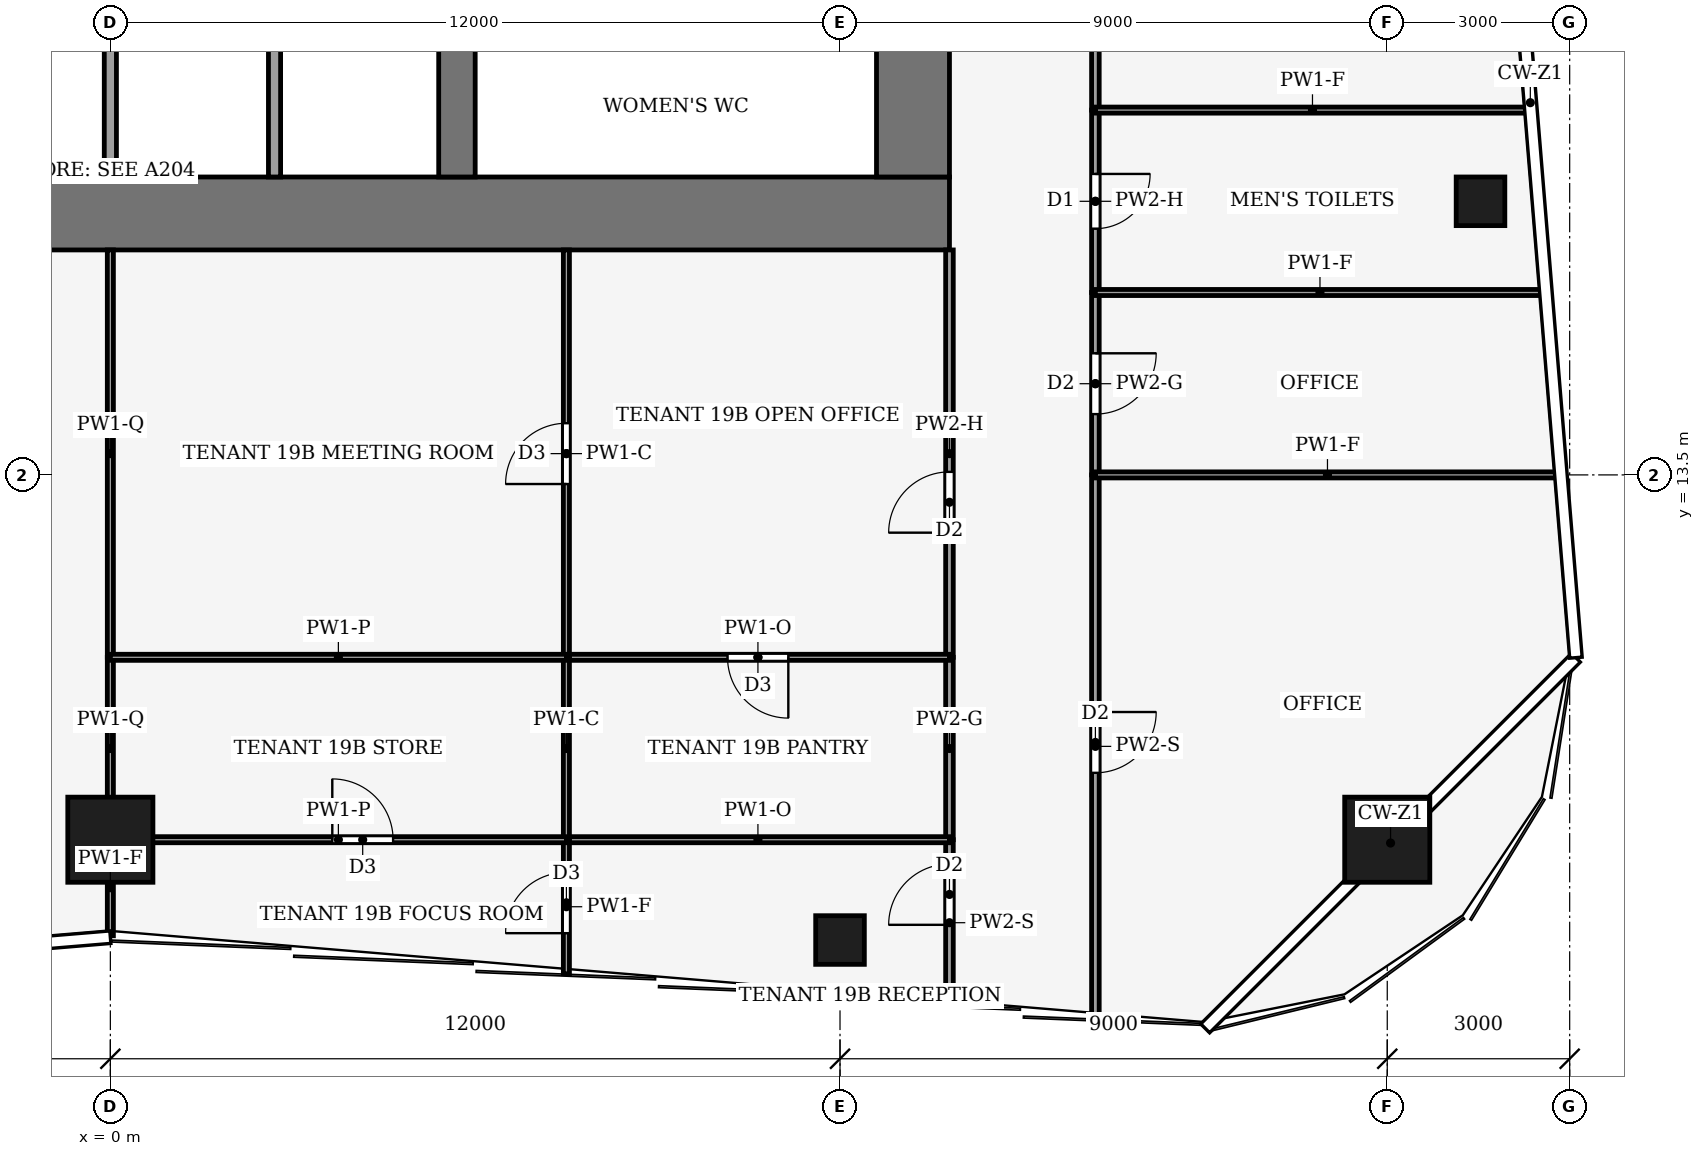
"""IFC4 building model, lengths in metres.
Left out: names, types, materials, properties, quantities, classifications, styles, units other than length and angle.
Written with IfcOpenShell. Run it as: python <this file> out.ifc"""

import sys

from ifc_helpers import new_model, si_unit, direction, frame, frame_2d, origin, origin_2d, place, context, subcontext, project, spatial, rectangle, hollow_rectangle, extrude, element, fill, save


model = new_model("IFC4")
c1 = context("Model", 3, precision=1e-05, world=origin(), true_north=direction((0.0, 1.0)))
c2 = subcontext(c1, "Body", "Model", "MODEL_VIEW")
j1 = project(units=[si_unit("LENGTHUNIT", "METRE"), si_unit("PLANEANGLEUNIT", "RADIAN")], contexts=[c1])
p1 = place(None, origin())
s1 = spatial("IfcSite", under=j1, at=p1, CompositionType="ELEMENT")
p2 = place(p1, origin())
s2 = spatial("IfcBuilding", under=s1, at=p2, CompositionType="ELEMENT")
p3 = place(p2, frame((0.0, 0.0, 86.0)))
s3 = spatial("IfcBuildingStorey", under=s2, at=p3, CompositionType="ELEMENT", Elevation=86.0)
p4 = place(p3, frame((-13.8, 17.8, -0.13), z_axis=(0.0, 0.0, 1.0), x_axis=(1.0, 0.0, 0.0)))
e1 = element("IfcWall", 1, at=p4, inside=s3, PredefinedType="SHEAR", context=c2, shape_type="SweptSolid", body=[
    extrude(rectangle(XDim=27.6, YDim=1.2, at=frame_2d((13.8, 0.0))), origin(), (0.0, 0.0, 1.0), 4.0),
])
p5 = place(p3, frame((13.2, 18.4, -0.13), z_axis=(0.0, 0.0, 1.0), x_axis=(0.0, 1.0, 0.0)))
e2 = element("IfcWall", 2, at=p5, inside=s3, PredefinedType="SHEAR", context=c2, shape_type="SweptSolid", body=[
    extrude(rectangle(XDim=19.2, YDim=1.2, at=frame_2d((9.6, 0.0))), origin(), (0.0, 0.0, 1.0), 4.0),
])
p6 = place(p5, frame((2.8, 0.0, 0.13)))
e3 = element("IfcOpeningElement", 3, at=p6, cuts=e2, PredefinedType="OPENING", context=c2, shape_type="SweptSolid", body=[
    extrude(rectangle(XDim=2.4, YDim=2.4, at=frame_2d((1.2, 1.2))), frame((0.0, 0.61, 0.0), z_axis=(0.0, -1.0, 0.0), x_axis=(1.0, 0.0, 0.0)), (0.0, 0.0, 1.0), 1.22),
])
p7 = place(p5, frame((13.3, 0.0, 0.13)))
e4 = element("IfcOpeningElement", 4, at=p7, cuts=e2, PredefinedType="OPENING", context=c2, shape_type="SweptSolid", body=[
    extrude(rectangle(XDim=2.4, YDim=2.4, at=frame_2d((1.2, 1.2))), frame((0.0, 0.61, 0.0), z_axis=(0.0, -1.0, 0.0), x_axis=(1.0, 0.0, 0.0)), (0.0, 0.0, 1.0), 1.22),
])
p8 = place(p3, frame((5.7, 18.4, -0.13), z_axis=(0.0, 0.0, 1.0), x_axis=(0.0, 1.0, 0.0)))
e5 = element("IfcWall", 5, at=p8, inside=s3, PredefinedType="SHEAR", context=c2, shape_type="SweptSolid", body=[
    extrude(rectangle(XDim=19.2, YDim=0.6, at=frame_2d((9.6, 0.0))), origin(), (0.0, 0.0, 1.0), 4.0),
])
p9 = place(p8, frame((13.3, 0.0, 0.13)))
e6 = element("IfcOpeningElement", 6, at=p9, cuts=e5, PredefinedType="OPENING", context=c2, shape_type="SweptSolid", body=[
    extrude(rectangle(XDim=2.4, YDim=2.4, at=frame_2d((1.2, 1.2))), frame((0.0, 0.31, 0.0), z_axis=(0.0, -1.0, 0.0), x_axis=(1.0, 0.0, 0.0)), (0.0, 0.0, 1.0), 0.62),
])
for number, where, z_axis, x_axis in (
    (7, (21.0, 7.5, 0.0), (0.0, 0.0, 1.0), (1.0, 0.0, 0.0)),
    (8, (0.0, 7.5, 0.0), (0.0, 0.0, 1.0), (1.0, 0.0, 0.0)),
):
    element("IfcColumn", number, at=place(p3, frame(where, z_axis=z_axis, x_axis=x_axis)), inside=s3, PredefinedType="COLUMN", context=c2, shape_type="SweptSolid", body=[
        extrude(hollow_rectangle(XDim=1.4, YDim=1.4, WallThickness=0.08, at=origin_2d()), origin(), (0.0, 0.0, 1.0), 4.0),
    ])
for number, where, z_axis, x_axis in (
    (9, (12.0, 5.85, 0.0), (0.0, 0.0, 1.0), (1.0, 0.0, 0.0)),
    (10, (22.534, 18.0, 0.0), (0.0, 0.0, 1.0), (1.0, 0.0, 0.0)),
):
    element("IfcColumn", number, at=place(p3, frame(where, z_axis=z_axis, x_axis=x_axis)), inside=s3, PredefinedType="COLUMN", context=c2, shape_type="SweptSolid", body=[
        extrude(hollow_rectangle(XDim=0.8, YDim=0.8, WallThickness=0.04, at=origin_2d()), origin(), (0.0, 0.0, 1.0), 4.0),
    ])
for number, where, z_axis, x_axis in (
    (11, (0.0, 18.4, 0.0), (0.0, 0.0, 1.0), (0.0, 1.0, 0.0)),
    (12, (2.7, 18.4, 0.0), (0.0, 0.0, 1.0), (0.0, 1.0, 0.0)),
):
    element("IfcWall", number, at=place(p3, frame(where, z_axis=z_axis, x_axis=x_axis)), inside=s3, PredefinedType="PARTITIONING", context=c2, shape_type="SweptSolid", body=[
        extrude(rectangle(XDim=2.4, YDim=0.2, at=frame_2d((1.2, 0.0))), origin(), (0.0, 0.0, 1.0), 3.87),
    ])
p10 = place(p3, frame((16.2, 13.5, 0.0), z_axis=(0.0, 0.0, 1.0), x_axis=(0.0, -1.0, 0.0)))
e13 = element("IfcWall", 13, at=p10, inside=s3, PredefinedType="PARTITIONING", context=c2, shape_type="SweptSolid", body=[
    extrude(rectangle(XDim=8.93, YDim=0.125, at=frame_2d((4.465, 0.0))), origin(), (0.0, 0.0, 1.0), 3.04),
])
p11 = place(p10, frame((3.9, 0.0, 0.0)))
e14 = element("IfcOpeningElement", 14, at=p11, cuts=e13, PredefinedType="OPENING", context=c2, shape_type="SweptSolid", body=[
    extrude(rectangle(XDim=1.0, YDim=2.1, at=frame_2d((0.5, 1.05))), frame((0.0, 0.073, 0.0), z_axis=(0.0, -1.0, 0.0), x_axis=(1.0, 0.0, 0.0)), (0.0, 0.0, 1.0), 0.145),
])
p12 = place(p3, frame((16.2, 16.5, 0.0), z_axis=(0.0, 0.0, 1.0), x_axis=(0.0, -1.0, 0.0)))
e15 = element("IfcWall", 15, at=p12, inside=s3, PredefinedType="PARTITIONING", context=c2, shape_type="SweptSolid", body=[
    extrude(rectangle(XDim=3.0, YDim=0.125, at=frame_2d((1.5, 0.0))), origin(), (0.0, 0.0, 1.0), 3.87),
])
p13 = place(p12, frame((1.0, 0.0, 0.0)))
e16 = element("IfcOpeningElement", 16, at=p13, cuts=e15, PredefinedType="OPENING", context=c2, shape_type="SweptSolid", body=[
    extrude(rectangle(XDim=1.0, YDim=2.1, at=frame_2d((0.5, 1.05))), frame((0.0, 0.073, 0.0), z_axis=(0.0, -1.0, 0.0), x_axis=(1.0, 0.0, 0.0)), (0.0, 0.0, 1.0), 0.145),
])
p14 = place(p3, frame((16.2, 19.5, 0.0), z_axis=(0.0, 0.0, 1.0), x_axis=(0.0, -1.0, 0.0)))
e17 = element("IfcWall", 17, at=p14, inside=s3, PredefinedType="PARTITIONING", context=c2, shape_type="SweptSolid", body=[
    extrude(rectangle(XDim=3.0, YDim=0.125, at=frame_2d((1.5, 0.0))), origin(), (0.0, 0.0, 1.0), 3.14),
])
p15 = place(p14, frame((1.05, 0.0, 0.0)))
e18 = element("IfcOpeningElement", 18, at=p15, cuts=e17, PredefinedType="OPENING", context=c2, shape_type="SweptSolid", body=[
    extrude(rectangle(XDim=0.9, YDim=2.1, at=frame_2d((0.45, 1.05))), frame((0.0, 0.073, 0.0), z_axis=(0.0, -1.0, 0.0), x_axis=(1.0, 0.0, 0.0)), (0.0, 0.0, 1.0), 0.145),
])
p16 = place(p3, frame((16.2, 22.5, 0.0), z_axis=(0.0, 0.0, 1.0), x_axis=(0.0, -1.0, 0.0)))
e19 = element("IfcWall", 19, at=p16, inside=s3, PredefinedType="PARTITIONING", context=c2, shape_type="SweptSolid", body=[
    extrude(rectangle(XDim=3.0, YDim=0.125, at=frame_2d((1.5, 0.0))), origin(), (0.0, 0.0, 1.0), 3.87),
])
p17 = place(p16, frame((1.05, 0.0, 0.0)))
e20 = element("IfcOpeningElement", 20, at=p17, cuts=e19, PredefinedType="OPENING", context=c2, shape_type="SweptSolid", body=[
    extrude(rectangle(XDim=0.9, YDim=2.1, at=frame_2d((0.45, 1.05))), frame((0.0, 0.073, 0.0), z_axis=(0.0, -1.0, 0.0), x_axis=(1.0, 0.0, 0.0)), (0.0, 0.0, 1.0), 0.145),
])
p18 = place(p3, frame((13.8, 4.77, 0.0), z_axis=(0.0, 0.0, 1.0), x_axis=(0.0, 1.0, 0.0)))
e21 = element("IfcWall", 21, at=p18, inside=s3, PredefinedType="PARTITIONING", context=c2, shape_type="SweptSolid", body=[
    extrude(rectangle(XDim=2.73, YDim=0.125, at=frame_2d((1.365, 0.0))), origin(), (0.0, 0.0, 1.0), 3.04),
])
p19 = place(p18, frame((1.33, 0.0, 0.0)))
e22 = element("IfcOpeningElement", 22, at=p19, cuts=e21, PredefinedType="OPENING", context=c2, shape_type="SweptSolid", body=[
    extrude(rectangle(XDim=1.0, YDim=2.1, at=frame_2d((0.5, 1.05))), frame((0.0, 0.073, 0.0), z_axis=(0.0, -1.0, 0.0), x_axis=(1.0, 0.0, 0.0)), (0.0, 0.0, 1.0), 0.145),
])
p20 = place(p3, frame((13.8, 10.5, 0.0), z_axis=(0.0, 0.0, 1.0), x_axis=(0.0, -1.0, 0.0)))
e23 = element("IfcWall", 23, at=p20, inside=s3, PredefinedType="PARTITIONING", context=c2, shape_type="SweptSolid", body=[
    extrude(rectangle(XDim=3.0, YDim=0.125, at=frame_2d((1.5, 0.0))), origin(), (0.0, 0.0, 1.0), 3.87),
])
p21 = place(p3, frame((13.8, 10.5, 0.0), z_axis=(0.0, 0.0, 1.0), x_axis=(0.0, 1.0, 0.0)))
e24 = element("IfcWall", 24, at=p21, inside=s3, PredefinedType="PARTITIONING", context=c2, shape_type="SweptSolid", body=[
    extrude(rectangle(XDim=6.7, YDim=0.125, at=frame_2d((3.35, 0.0))), origin(), (0.0, 0.0, 1.0), 3.14),
])
p22 = place(p21, frame((2.05, 0.0, 0.0)))
e25 = element("IfcOpeningElement", 25, at=p22, cuts=e24, PredefinedType="OPENING", context=c2, shape_type="SweptSolid", body=[
    extrude(rectangle(XDim=1.0, YDim=2.1, at=frame_2d((0.5, 1.05))), frame((0.0, 0.073, 0.0), z_axis=(0.0, -1.0, 0.0), x_axis=(1.0, 0.0, 0.0)), (0.0, 0.0, 1.0), 0.145),
])
p23 = place(p3, frame((23.833, 13.5, 0.0), z_axis=(0.0, 0.0, 1.0), x_axis=(-1.0, 0.0, 0.0)))
e26 = element("IfcWall", 26, at=p23, inside=s3, PredefinedType="PARTITIONING", context=c2, shape_type="SweptSolid", body=[
    extrude(rectangle(XDim=7.634, YDim=0.1, at=frame_2d((3.817, 0.0))), origin(), (0.0, 0.0, 1.0), 3.04),
])
p24 = place(p3, frame((23.587, 16.5, 0.0), z_axis=(0.0, 0.0, 1.0), x_axis=(-1.0, 0.0, 0.0)))
e27 = element("IfcWall", 27, at=p24, inside=s3, PredefinedType="PARTITIONING", context=c2, shape_type="SweptSolid", body=[
    extrude(rectangle(XDim=7.387, YDim=0.1, at=frame_2d((3.693, 0.0))), origin(), (0.0, 0.0, 1.0), 3.04),
])
p25 = place(p3, frame((23.34, 19.5, 0.0), z_axis=(0.0, 0.0, 1.0), x_axis=(-1.0, 0.0, 0.0)))
e28 = element("IfcWall", 28, at=p25, inside=s3, PredefinedType="PARTITIONING", context=c2, shape_type="SweptSolid", body=[
    extrude(rectangle(XDim=7.14, YDim=0.1, at=frame_2d((3.57, 0.0))), origin(), (0.0, 0.0, 1.0), 3.04),
])
p26 = place(p3, frame((0.0, 5.92, 0.0), z_axis=(0.0, 0.0, 1.0), x_axis=(0.0, 1.0, 0.0)))
e29 = element("IfcWall", 29, at=p26, inside=s3, PredefinedType="PARTITIONING", context=c2, shape_type="SweptSolid", body=[
    extrude(rectangle(XDim=1.58, YDim=0.1, at=frame_2d((0.79, 0.0))), origin(), (0.0, 0.0, 1.0), 3.04),
])
p27 = place(p3, frame((0.0, 7.5, 0.0), z_axis=(0.0, 0.0, 1.0), x_axis=(0.0, 1.0, 0.0)))
e30 = element("IfcWall", 30, at=p27, inside=s3, PredefinedType="PARTITIONING", context=c2, shape_type="SweptSolid", body=[
    extrude(rectangle(XDim=3.0, YDim=0.1, at=frame_2d((1.5, 0.0))), origin(), (0.0, 0.0, 1.0), 3.48),
])
p28 = place(p3, frame((0.0, 10.5, 0.0), z_axis=(0.0, 0.0, 1.0), x_axis=(0.0, 1.0, 0.0)))
e31 = element("IfcWall", 31, at=p28, inside=s3, PredefinedType="PARTITIONING", context=c2, shape_type="SweptSolid", body=[
    extrude(rectangle(XDim=6.7, YDim=0.1, at=frame_2d((3.35, 0.0))), origin(), (0.0, 0.0, 1.0), 3.48),
])
p29 = place(p3, frame((13.8, 7.5, 0.0), z_axis=(0.0, 0.0, 1.0), x_axis=(-1.0, 0.0, 0.0)))
e32 = element("IfcWall", 32, at=p29, inside=s3, PredefinedType="PARTITIONING", context=c2, shape_type="SweptSolid", body=[
    extrude(rectangle(XDim=6.3, YDim=0.1, at=frame_2d((3.15, 0.0))), origin(), (0.0, 0.0, 1.0), 3.39),
])
p30 = place(p3, frame((7.5, 5.295, 0.0), z_axis=(0.0, 0.0, 1.0), x_axis=(0.0, 1.0, 0.0)))
e33 = element("IfcWall", 33, at=p30, inside=s3, PredefinedType="PARTITIONING", context=c2, shape_type="SweptSolid", body=[
    extrude(rectangle(XDim=2.205, YDim=0.1, at=frame_2d((1.103, 0.0))), origin(), (0.0, 0.0, 1.0), 3.04),
])
p31 = place(p30, frame((0.667, 0.0, 0.0)))
e34 = element("IfcOpeningElement", 34, at=p31, cuts=e33, PredefinedType="OPENING", context=c2, shape_type="SweptSolid", body=[
    extrude(rectangle(XDim=1.0, YDim=2.1, at=frame_2d((0.5, 1.05))), frame((0.0, 0.06, 0.0), z_axis=(0.0, -1.0, 0.0), x_axis=(1.0, 0.0, 0.0)), (0.0, 0.0, 1.0), 0.12),
])
p32 = place(p3, frame((13.8, 10.5, 0.0), z_axis=(0.0, 0.0, 1.0), x_axis=(-1.0, 0.0, 0.0)))
e35 = element("IfcWall", 35, at=p32, inside=s3, PredefinedType="PARTITIONING", context=c2, shape_type="SweptSolid", body=[
    extrude(rectangle(XDim=6.3, YDim=0.1, at=frame_2d((3.15, 0.0))), origin(), (0.0, 0.0, 1.0), 3.39),
])
p33 = place(p32, frame((2.65, 0.0, 0.0)))
e36 = element("IfcOpeningElement", 36, at=p33, cuts=e35, PredefinedType="OPENING", context=c2, shape_type="SweptSolid", body=[
    extrude(rectangle(XDim=1.0, YDim=2.1, at=frame_2d((0.5, 1.05))), frame((0.0, 0.06, 0.0), z_axis=(0.0, -1.0, 0.0), x_axis=(1.0, 0.0, 0.0)), (0.0, 0.0, 1.0), 0.12),
])
p34 = place(p3, frame((7.5, 10.5, 0.0), z_axis=(0.0, 0.0, 1.0), x_axis=(0.0, -1.0, 0.0)))
e37 = element("IfcWall", 37, at=p34, inside=s3, PredefinedType="PARTITIONING", context=c2, shape_type="SweptSolid", body=[
    extrude(rectangle(XDim=3.0, YDim=0.1, at=frame_2d((1.5, 0.0))), origin(), (0.0, 0.0, 1.0), 3.87),
])
p35 = place(p3, frame((7.5, 10.5, 0.0), z_axis=(0.0, 0.0, 1.0), x_axis=(0.0, 1.0, 0.0)))
e38 = element("IfcWall", 38, at=p35, inside=s3, PredefinedType="PARTITIONING", context=c2, shape_type="SweptSolid", body=[
    extrude(rectangle(XDim=6.7, YDim=0.1, at=frame_2d((3.35, 0.0))), origin(), (0.0, 0.0, 1.0), 3.87),
])
p36 = place(p35, frame((2.85, 0.0, 0.0)))
e39 = element("IfcOpeningElement", 39, at=p36, cuts=e38, PredefinedType="OPENING", context=c2, shape_type="SweptSolid", body=[
    extrude(rectangle(XDim=1.0, YDim=2.1, at=frame_2d((0.5, 1.05))), frame((0.0, 0.06, 0.0), z_axis=(0.0, -1.0, 0.0), x_axis=(1.0, 0.0, 0.0)), (0.0, 0.0, 1.0), 0.12),
])
p37 = place(p3, frame((0.0, 7.5, 0.0), z_axis=(0.0, 0.0, 1.0), x_axis=(1.0, 0.0, 0.0)))
e40 = element("IfcWall", 40, at=p37, inside=s3, PredefinedType="PARTITIONING", context=c2, shape_type="SweptSolid", body=[
    extrude(rectangle(XDim=7.5, YDim=0.1, at=frame_2d((3.75, 0.0))), origin(), (0.0, 0.0, 1.0), 3.44),
])
p38 = place(p37, frame((3.65, 0.0, 0.0)))
e41 = element("IfcOpeningElement", 41, at=p38, cuts=e40, PredefinedType="OPENING", context=c2, shape_type="SweptSolid", body=[
    extrude(rectangle(XDim=1.0, YDim=2.1, at=frame_2d((0.5, 1.05))), frame((0.0, 0.06, 0.0), z_axis=(0.0, -1.0, 0.0), x_axis=(1.0, 0.0, 0.0)), (0.0, 0.0, 1.0), 0.12),
])
p39 = place(p3, frame((7.5, 10.5, 0.0), z_axis=(0.0, 0.0, 1.0), x_axis=(-1.0, 0.0, 0.0)))
e42 = element("IfcWall", 42, at=p39, inside=s3, PredefinedType="PARTITIONING", context=c2, shape_type="SweptSolid", body=[
    extrude(rectangle(XDim=7.5, YDim=0.1, at=frame_2d((3.75, 0.0))), origin(), (0.0, 0.0, 1.0), 3.44),
])
p40 = place(p11, origin())
e43 = element("IfcDoor", 43, at=p40, inside=s3, OperationType="SINGLE_SWING_LEFT", PredefinedType="DOOR", context=c2, shape_type="SweptSolid", body=[
    extrude(rectangle(XDim=1.0, YDim=2.1, at=frame_2d((0.5, 1.05))), frame((0.0, 0.025, 0.0), z_axis=(0.0, -1.0, 0.0), x_axis=(1.0, 0.0, 0.0)), (0.0, 0.0, 1.0), 0.05),
])
fill(e14, e43)
p41 = place(p13, origin())
e44 = element("IfcDoor", 44, at=p41, inside=s3, OperationType="SINGLE_SWING_LEFT", PredefinedType="DOOR", context=c2, shape_type="SweptSolid", body=[
    extrude(rectangle(XDim=1.0, YDim=2.1, at=frame_2d((0.5, 1.05))), frame((0.0, 0.025, 0.0), z_axis=(0.0, -1.0, 0.0), x_axis=(1.0, 0.0, 0.0)), (0.0, 0.0, 1.0), 0.05),
])
fill(e16, e44)
p42 = place(p15, origin())
e45 = element("IfcDoor", 45, at=p42, inside=s3, OperationType="SINGLE_SWING_RIGHT", PredefinedType="DOOR", context=c2, shape_type="SweptSolid", body=[
    extrude(rectangle(XDim=0.9, YDim=2.1, at=frame_2d((0.45, 1.05))), frame((0.0, 0.025, 0.0), z_axis=(0.0, -1.0, 0.0), x_axis=(1.0, 0.0, 0.0)), (0.0, 0.0, 1.0), 0.05),
])
fill(e18, e45)
p43 = place(p19, origin())
e46 = element("IfcDoor", 46, at=p43, inside=s3, OperationType="SINGLE_SWING_RIGHT", PredefinedType="DOOR", context=c2, shape_type="SweptSolid", body=[
    extrude(rectangle(XDim=1.0, YDim=2.1, at=frame_2d((0.5, 1.05))), frame((0.0, 0.025, 0.0), z_axis=(0.0, -1.0, 0.0), x_axis=(1.0, 0.0, 0.0)), (0.0, 0.0, 1.0), 0.05),
])
fill(e22, e46)
p44 = place(p22, origin())
e47 = element("IfcDoor", 47, at=p44, inside=s3, OperationType="SINGLE_SWING_LEFT", PredefinedType="DOOR", context=c2, shape_type="SweptSolid", body=[
    extrude(rectangle(XDim=1.0, YDim=2.1, at=frame_2d((0.5, 1.05))), frame((0.0, 0.025, 0.0), z_axis=(0.0, -1.0, 0.0), x_axis=(1.0, 0.0, 0.0)), (0.0, 0.0, 1.0), 0.05),
])
fill(e25, e47)
p45 = place(p31, origin())
e48 = element("IfcDoor", 48, at=p45, inside=s3, OperationType="SINGLE_SWING_RIGHT", PredefinedType="DOOR", context=c2, shape_type="SweptSolid", body=[
    extrude(rectangle(XDim=1.0, YDim=2.1, at=frame_2d((0.5, 1.05))), frame((0.0, 0.025, 0.0), z_axis=(0.0, -1.0, 0.0), x_axis=(1.0, 0.0, 0.0)), (0.0, 0.0, 1.0), 0.05),
])
fill(e34, e48)
p46 = place(p33, origin())
e49 = element("IfcDoor", 49, at=p46, inside=s3, OperationType="SINGLE_SWING_RIGHT", PredefinedType="DOOR", context=c2, shape_type="SweptSolid", body=[
    extrude(rectangle(XDim=1.0, YDim=2.1, at=frame_2d((0.5, 1.05))), frame((0.0, 0.025, 0.0), z_axis=(0.0, -1.0, 0.0), x_axis=(1.0, 0.0, 0.0)), (0.0, 0.0, 1.0), 0.05),
])
fill(e36, e49)
p47 = place(p36, origin())
e50 = element("IfcDoor", 50, at=p47, inside=s3, OperationType="SINGLE_SWING_LEFT", PredefinedType="DOOR", context=c2, shape_type="SweptSolid", body=[
    extrude(rectangle(XDim=1.0, YDim=2.1, at=frame_2d((0.5, 1.05))), frame((0.0, 0.025, 0.0), z_axis=(0.0, -1.0, 0.0), x_axis=(1.0, 0.0, 0.0)), (0.0, 0.0, 1.0), 0.05),
])
fill(e39, e50)
p48 = place(p38, origin())
e51 = element("IfcDoor", 51, at=p48, inside=s3, OperationType="SINGLE_SWING_RIGHT", PredefinedType="DOOR", context=c2, shape_type="SweptSolid", body=[
    extrude(rectangle(XDim=1.0, YDim=2.1, at=frame_2d((0.5, 1.05))), frame((0.0, 0.025, 0.0), z_axis=(0.0, -1.0, 0.0), x_axis=(1.0, 0.0, 0.0)), (0.0, 0.0, 1.0), 0.05),
])
fill(e41, e51)
save(model, sys.argv[1])
